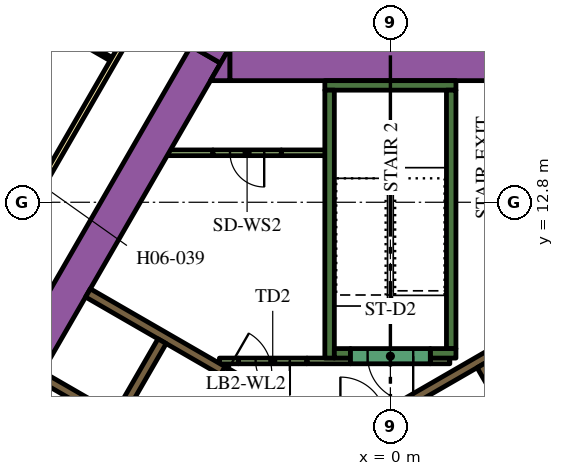
"""IFC4 building model, lengths in metres.
Left out: names, types, materials, properties, quantities, classifications, styles, units other than length and angle.
Written with IfcOpenShell. Run it as: python <this file> out.ifc"""

import sys

from ifc_helpers import new_model, si_unit, direction, frame, frame_2d, origin, place, context, subcontext, project, spatial, polyline, rectangle, outline, extrude, element, fill, save


model = new_model("IFC4")
c1 = context("Model", 3, precision=1e-05, world=origin(), true_north=direction((0.0, 1.0)))
c2 = subcontext(c1, "Body", "Model", "MODEL_VIEW")
j1 = project(units=[si_unit("LENGTHUNIT", "METRE"), si_unit("PLANEANGLEUNIT", "RADIAN")], contexts=[c1])
p1 = place(None, origin())
s1 = spatial("IfcSite", under=j1, at=p1, CompositionType="ELEMENT")
p2 = place(p1, origin())
s2 = spatial("IfcBuilding", under=s1, at=p2, CompositionType="ELEMENT")
p3 = place(p2, frame((0.0, 0.0, 83.7)))
s3 = spatial("IfcBuildingStorey", under=s2, at=p3, CompositionType="ELEMENT", Elevation=83.7)
p4 = place(p3, frame((-15.36, -1.503, 0.0), z_axis=(0.0, 0.0, 1.0), x_axis=(0.50000389221, 0.866023156604, 0.0)))
e1 = element("IfcWall", 1, at=p4, inside=s3, PredefinedType="SOLIDWALL", context=c2, shape_type="SweptSolid", body=[
    extrude(rectangle(XDim=21.0, YDim=0.9, at=frame_2d((10.5, 0.0))), origin(), (0.0, 0.0, 1.0), 3.9),
])
p5 = place(p3, origin())
e2 = element("IfcWall", 2, at=p5, inside=s3, PredefinedType="SOLIDWALL", context=c2, shape_type="SweptSolid", body=[
    extrude(outline(polyline([(-4.215, 16.9), (-4.469, 16.46), (-5.231, 16.9), (-4.215, 16.9)])), origin(), (0.0, 0.0, 1.0), 3.9),
])
p6 = place(p3, frame((-4.224, 16.45, 0.0), z_axis=(0.0, 0.0, 1.0), x_axis=(1.0, 0.0, 0.0)))
e3 = element("IfcWall", 3, at=p6, inside=s3, PredefinedType="SOLIDWALL", context=c2, shape_type="SweptSolid", body=[
    extrude(rectangle(XDim=9.488, YDim=0.9, at=frame_2d((4.744, 0.0))), origin(), (0.0, 0.0, 1.0), 3.9),
])
e4 = element("IfcWall", 4, at=p5, inside=s3, PredefinedType="SOLIDWALL", context=c2, shape_type="SweptSolid", body=[
    extrude(outline(polyline([(-4.734, 16.0), (-4.226, 16.88), (-4.226, 16.0), (-4.734, 16.0)])), origin(), (0.0, 0.0, 1.0), 3.9),
])
p7 = place(p3, frame((-1.725, 15.875, 0.0), z_axis=(0.0, 0.0, 1.0), x_axis=(1.0, 0.0, 0.0)))
e5 = element("IfcWall", 5, at=p7, inside=s3, PredefinedType="SOLIDWALL", context=c2, shape_type="SweptSolid", body=[
    extrude(rectangle(XDim=3.45, YDim=0.25, at=frame_2d((1.725, 0.0))), origin(), (0.0, 0.0, 1.0), 3.9),
])
p8 = place(p3, frame((1.6, 8.95, 0.0), z_axis=(0.0, 0.0, 1.0), x_axis=(0.0, 1.0, 0.0)))
e6 = element("IfcWall", 6, at=p8, inside=s3, PredefinedType="SOLIDWALL", context=c2, shape_type="SweptSolid", body=[
    extrude(rectangle(XDim=6.8, YDim=0.25, at=frame_2d((3.4, 0.0))), origin(), (0.0, 0.0, 1.0), 3.9),
])
p9 = place(p3, frame((1.05, 8.825, 0.0), z_axis=(0.0, 0.0, 1.0), x_axis=(1.0, 0.0, 0.0)))
e7 = element("IfcWall", 7, at=p9, inside=s3, PredefinedType="SOLIDWALL", context=c2, shape_type="SweptSolid", body=[
    extrude(rectangle(XDim=0.675, YDim=0.25, at=frame_2d((0.337, 0.0))), origin(), (0.0, 0.0, 1.0), 3.9),
])
p10 = place(p3, frame((-1.6, 8.7, 0.0), z_axis=(0.0, 0.0, 1.0), x_axis=(0.0, 1.0, 0.0)))
e8 = element("IfcWall", 8, at=p10, inside=s3, PredefinedType="SOLIDWALL", context=c2, shape_type="SweptSolid", body=[
    extrude(rectangle(XDim=7.05, YDim=0.25, at=frame_2d((3.525, 0.0))), origin(), (0.0, 0.0, 1.0), 3.9),
])
p11 = place(p3, frame((-1.475, 8.825, 0.0), z_axis=(0.0, 0.0, 1.0), x_axis=(1.0, 0.0, 0.0)))
e9 = element("IfcWall", 9, at=p11, inside=s3, PredefinedType="SOLIDWALL", context=c2, shape_type="SweptSolid", body=[
    extrude(rectangle(XDim=0.425, YDim=0.25, at=frame_2d((0.212, 0.0))), origin(), (0.0, 0.0, 1.0), 3.9),
])
p12 = place(p3, frame((0.314, 7.456, 0.0), z_axis=(0.0, 0.0, 1.0), x_axis=(0.866013897511, 0.50001992892, 0.0)))
e10 = element("IfcWall", 10, at=p12, inside=s3, PredefinedType="SOLIDWALL", context=c2, shape_type="SweptSolid", body=[
    extrude(rectangle(XDim=3.268, YDim=0.25, at=frame_2d((1.634, 0.0))), origin(), (0.0, 0.0, 1.0), 3.9),
])
e11 = element("IfcWall", 11, at=p5, inside=s3, PredefinedType="SOLIDWALL", context=c2, shape_type="SweptSolid", body=[
    extrude(outline(polyline([(-3.128, 7.481), (-3.259, 7.557), (-3.134, 7.773), (-3.003, 7.698), (-3.128, 7.481)])), origin(), (0.0, 0.0, 1.0), 3.9),
])
p13 = place(p3, frame((-7.314, 7.132, 0.0), z_axis=(0.0, 0.0, 1.0), x_axis=(-0.866008176907, 0.50002983664, 0.0)))
e12 = element("IfcWall", 12, at=p13, inside=s3, PredefinedType="SOLIDWALL", context=c2, shape_type="SweptSolid", body=[
    extrude(rectangle(XDim=2.2, YDim=0.25, at=frame_2d((1.1, 0.0))), origin(), (0.0, 0.0, 1.0), 3.9),
])
p14 = place(p3, frame((-7.959, 10.415, 0.0), z_axis=(0.0, 0.0, 1.0), x_axis=(0.866020958405, -0.500007699544, 0.0)))
e13 = element("IfcWall", 13, at=p14, inside=s3, PredefinedType="SOLIDWALL", context=c2, shape_type="SweptSolid", body=[
    extrude(rectangle(XDim=4.1, YDim=0.25, at=frame_2d((2.05, 0.0))), origin(), (0.0, 0.0, 1.0), 3.9),
])
p15 = place(p3, frame((-3.997, 8.625, 0.0), z_axis=(0.0, 0.0, 1.0), x_axis=(-1.0, 0.0, 0.0)))
e14 = element("IfcWall", 14, at=p15, inside=s3, PredefinedType="PARTITIONING", context=c2, shape_type="SweptSolid", body=[
    extrude(rectangle(XDim=0.502, YDim=0.15, at=frame_2d((0.251, 0.0))), origin(), (0.0, 0.0, 1.0), 2.75),
])
p16 = place(p3, frame((-5.851, 14.102, 0.0), z_axis=(0.0, 0.0, 1.0), x_axis=(1.0, 0.0, 0.0)))
e15 = element("IfcWall", 15, at=p16, inside=s3, PredefinedType="PARTITIONING", context=c2, shape_type="SweptSolid", body=[
    extrude(rectangle(XDim=1.18, YDim=0.15, at=frame_2d((0.59, 0.0))), origin(), (0.0, 0.0, 1.0), 2.75),
])
p17 = place(p3, frame((-2.871, 14.102, 0.0), z_axis=(0.0, 0.0, 1.0), x_axis=(1.0, 0.0, 0.0)))
e16 = element("IfcWall", 16, at=p17, inside=s3, PredefinedType="PARTITIONING", context=c2, shape_type="SweptSolid", body=[
    extrude(rectangle(XDim=1.196, YDim=0.15, at=frame_2d((0.598, 0.0))), origin(), (0.0, 0.0, 1.0), 2.75),
])
p18 = place(p3, frame((-2.196, 8.625, 0.0), z_axis=(0.0, 0.0, 1.0), x_axis=(1.0, 0.0, 0.0)))
e17 = element("IfcWall", 17, at=p18, inside=s3, PredefinedType="PARTITIONING", context=c2, shape_type="SweptSolid", body=[
    extrude(rectangle(XDim=1.146, YDim=0.15, at=frame_2d((0.573, 0.0))), origin(), (0.0, 0.0, 1.0), 2.75),
])
p19 = place(p3, frame((1.05, 8.625, 0.0), z_axis=(0.0, 0.0, 1.0), x_axis=(1.0, 0.0, 0.0)))
e18 = element("IfcWall", 18, at=p19, inside=s3, PredefinedType="PARTITIONING", context=c2, shape_type="SweptSolid", body=[
    extrude(rectangle(XDim=0.514, YDim=0.15, at=frame_2d((0.257, 0.0))), origin(), (0.0, 0.0, 1.0), 2.75),
])
p20 = place(p3, frame((8.565, -2.185, 0.0), z_axis=(0.0, 0.0, 1.0), x_axis=(-0.499997954832, 0.866026584559, 0.0)))
e19 = element("IfcWall", 19, at=p20, inside=s3, PredefinedType="SOLIDWALL", context=c2, shape_type="SweptSolid", body=[
    extrude(rectangle(XDim=12.35, YDim=0.25, at=frame_2d((6.175, 0.0))), origin(), (0.0, 0.0, 1.0), 3.9),
])
p21 = place(p20, frame((5.725, 0.0, 0.0)))
e20 = element("IfcOpeningElement", 20, at=p21, cuts=e19, PredefinedType="OPENING", context=c2, shape_type="SweptSolid", body=[
    extrude(rectangle(XDim=0.9, YDim=2.1, at=frame_2d((0.45, 1.05))), frame((0.0, 0.135, 0.0), z_axis=(0.0, -1.0, 0.0), x_axis=(1.0, 0.0, 0.0)), (0.0, 0.0, 1.0), 0.27),
])
p22 = place(p3, frame((-6.008, 9.144, 0.0), z_axis=(0.0, 0.0, 1.0), x_axis=(-0.500006956611, -0.866021387346, 0.0)))
e21 = element("IfcWall", 21, at=p22, inside=s3, PredefinedType="SOLIDWALL", context=c2, shape_type="SweptSolid", body=[
    extrude(rectangle(XDim=9.83, YDim=0.25, at=frame_2d((4.915, 0.0))), origin(), (0.0, 0.0, 1.0), 3.9),
])
p23 = place(p22, frame((6.985, 0.0, 0.0)))
e22 = element("IfcOpeningElement", 22, at=p23, cuts=e21, PredefinedType="OPENING", context=c2, shape_type="SweptSolid", body=[
    extrude(rectangle(XDim=0.9, YDim=2.1, at=frame_2d((0.45, 1.05))), frame((0.0, 0.135, 0.0), z_axis=(0.0, -1.0, 0.0), x_axis=(1.0, 0.0, 0.0)), (0.0, 0.0, 1.0), 0.27),
])
p24 = place(p3, frame((1.05, 8.75, 0.0), z_axis=(0.0, 0.0, 1.0), x_axis=(-1.0, 0.0, 0.0)))
e23 = element("IfcWall", 23, at=p24, inside=s3, PredefinedType="SOLIDWALL", context=c2, shape_type="SweptSolid", body=[
    extrude(rectangle(XDim=2.1, YDim=0.4, at=frame_2d((1.05, 0.0))), origin(), (0.0, 0.0, 1.0), 3.9),
])
p25 = place(p24, frame((0.45, 0.0, 0.0)))
e24 = element("IfcOpeningElement", 24, at=p25, cuts=e23, PredefinedType="OPENING", context=c2, shape_type="SweptSolid", body=[
    extrude(rectangle(XDim=1.2, YDim=2.1, at=frame_2d((0.6, 1.05))), frame((0.0, 0.21, 0.0), z_axis=(0.0, -1.0, 0.0), x_axis=(1.0, 0.0, 0.0)), (0.0, 0.0, 1.0), 0.42),
])
p26 = place(p3, frame((-2.196, 8.625, 0.0), z_axis=(0.0, 0.0, 1.0), x_axis=(-1.0, 0.0, 0.0)))
e25 = element("IfcWall", 25, at=p26, inside=s3, PredefinedType="PARTITIONING", context=c2, shape_type="SweptSolid", body=[
    extrude(rectangle(XDim=1.8, YDim=0.15, at=frame_2d((0.9, 0.0))), origin(), (0.0, 0.0, 1.0), 2.75),
])
p27 = place(p26, frame((0.45, 0.0, 0.0)))
e26 = element("IfcOpeningElement", 26, at=p27, cuts=e25, PredefinedType="OPENING", context=c2, shape_type="SweptSolid", body=[
    extrude(rectangle(XDim=0.9, YDim=2.1, at=frame_2d((0.45, 1.05))), frame((0.0, 0.085, 0.0), z_axis=(0.0, -1.0, 0.0), x_axis=(1.0, 0.0, 0.0)), (0.0, 0.0, 1.0), 0.17),
])
p28 = place(p3, frame((-4.409, 8.365, 0.0), z_axis=(0.0, 0.0, 1.0), x_axis=(0.866034573852, -0.49998411664, 0.0)))
e27 = element("IfcWall", 27, at=p28, inside=s3, PredefinedType="SOLIDWALL", context=c2, shape_type="SweptSolid", body=[
    extrude(rectangle(XDim=1.4, YDim=0.25, at=frame_2d((0.7, 0.0))), origin(), (0.0, 0.0, 1.0), 3.9),
])
p29 = place(p28, frame((0.1, 0.0, 0.0)))
e28 = element("IfcOpeningElement", 28, at=p29, cuts=e27, PredefinedType="OPENING", context=c2, shape_type="SweptSolid", body=[
    extrude(rectangle(XDim=1.2, YDim=2.1, at=frame_2d((0.6, 1.05))), frame((0.0, 0.135, 0.0), z_axis=(0.0, -1.0, 0.0), x_axis=(1.0, 0.0, 0.0)), (0.0, 0.0, 1.0), 0.27),
])
p30 = place(p3, frame((-2.871, 14.102, 0.0), z_axis=(0.0, 0.0, 1.0), x_axis=(-1.0, 0.0, 0.0)))
e29 = element("IfcWall", 29, at=p30, inside=s3, PredefinedType="PARTITIONING", context=c2, shape_type="SweptSolid", body=[
    extrude(rectangle(XDim=1.8, YDim=0.15, at=frame_2d((0.9, 0.0))), origin(), (0.0, 0.0, 1.0), 2.75),
])
p31 = place(p30, frame((0.45, 0.0, 0.0)))
e30 = element("IfcOpeningElement", 30, at=p31, cuts=e29, PredefinedType="OPENING", context=c2, shape_type="SweptSolid", body=[
    extrude(rectangle(XDim=0.9, YDim=2.1, at=frame_2d((0.45, 1.05))), frame((0.0, 0.085, 0.0), z_axis=(0.0, -1.0, 0.0), x_axis=(1.0, 0.0, 0.0)), (0.0, 0.0, 1.0), 0.17),
])
p32 = place(p3, frame((-19.081, -3.9, 0.0), z_axis=(0.0, 0.0, 1.0), x_axis=(0.499998313975, 0.866026377209, 0.0)))
e31 = element("IfcWall", 31, at=p32, inside=s3, PredefinedType="PARTITIONING", context=c2, shape_type="SweptSolid", body=[
    extrude(rectangle(XDim=25.766, YDim=0.15, at=frame_2d((12.883, 0.0))), origin(), (0.0, 0.0, 1.0), 2.75),
])
p33 = place(p32, frame((19.306, 0.0, 0.0)))
e32 = element("IfcOpeningElement", 32, at=p33, cuts=e31, PredefinedType="OPENING", context=c2, shape_type="SweptSolid", body=[
    extrude(rectangle(XDim=1.0, YDim=2.1, at=frame_2d((0.5, 1.05))), frame((0.0, 0.085, 0.0), z_axis=(0.0, -1.0, 0.0), x_axis=(1.0, 0.0, 0.0)), (0.0, 0.0, 1.0), 0.17),
])
p34 = place(p32, frame((18.0, 0.0, 0.0)))
e33 = element("IfcOpeningElement", 33, at=p34, cuts=e31, PredefinedType="OPENING", context=c2, shape_type="SweptSolid", body=[
    extrude(rectangle(XDim=1.0, YDim=2.1, at=frame_2d((0.5, 1.05))), frame((0.0, 0.085, 0.0), z_axis=(0.0, -1.0, 0.0), x_axis=(1.0, 0.0, 0.0)), (0.0, 0.0, 1.0), 0.17),
])
p35 = place(p32, frame((10.874, 0.0, 0.0)))
e34 = element("IfcOpeningElement", 34, at=p35, cuts=e31, PredefinedType="OPENING", context=c2, shape_type="SweptSolid", body=[
    extrude(rectangle(XDim=0.9, YDim=2.1, at=frame_2d((0.45, 1.05))), frame((0.0, 0.085, 0.0), z_axis=(0.0, -1.0, 0.0), x_axis=(1.0, 0.0, 0.0)), (0.0, 0.0, 1.0), 0.17),
])
p36 = place(p32, frame((8.548, 0.0, 0.0)))
e35 = element("IfcOpeningElement", 35, at=p36, cuts=e31, PredefinedType="OPENING", context=c2, shape_type="SweptSolid", body=[
    extrude(rectangle(XDim=1.1, YDim=2.1, at=frame_2d((0.55, 1.05))), frame((0.0, 0.085, 0.0), z_axis=(0.0, -1.0, 0.0), x_axis=(1.0, 0.0, 0.0)), (0.0, 0.0, 1.0), 0.17),
])
p37 = place(p32, frame((0.18, 0.0, 0.0)))
e36 = element("IfcOpeningElement", 36, at=p37, cuts=e31, PredefinedType="OPENING", context=c2, shape_type="SweptSolid", body=[
    extrude(rectangle(XDim=1.0, YDim=2.1, at=frame_2d((0.5, 1.05))), frame((0.0, 0.085, 0.0), z_axis=(0.0, -1.0, 0.0), x_axis=(1.0, 0.0, 0.0)), (0.0, 0.0, 1.0), 0.17),
])
p38 = place(p3, frame((-9.603, 17.868, 0.0), z_axis=(0.0, 0.0, 1.0), x_axis=(0.866021400173, -0.500006934395, 0.0)))
e37 = element("IfcWall", 37, at=p38, inside=s3, PredefinedType="PARTITIONING", context=c2, shape_type="SweptSolid", body=[
    extrude(rectangle(XDim=2.6, YDim=0.1, at=frame_2d((1.3, 0.0))), origin(), (0.0, 0.0, 1.0), 2.75),
])
p39 = place(p38, frame((1.1, 0.0, 0.0)))
e38 = element("IfcOpeningElement", 38, at=p39, cuts=e37, PredefinedType="OPENING", context=c2, shape_type="SweptSolid", body=[
    extrude(rectangle(XDim=0.9, YDim=2.1, at=frame_2d((0.45, 1.05))), frame((0.0, 0.06, 0.0), z_axis=(0.0, -1.0, 0.0), x_axis=(1.0, 0.0, 0.0)), (0.0, 0.0, 1.0), 0.12),
])
p40 = place(p25, origin())
e39 = element("IfcDoor", 39, at=p40, inside=s3, OperationType="SINGLE_SWING_LEFT", PredefinedType="DOOR", context=c2, shape_type="SweptSolid", body=[
    extrude(rectangle(XDim=1.2, YDim=2.1, at=frame_2d((0.6, 1.05))), frame((0.0, 0.025, 0.0), z_axis=(0.0, -1.0, 0.0), x_axis=(1.0, 0.0, 0.0)), (0.0, 0.0, 1.0), 0.05),
])
fill(e24, e39)
p41 = place(p27, origin())
e40 = element("IfcDoor", 40, at=p41, inside=s3, OperationType="SINGLE_SWING_LEFT", PredefinedType="DOOR", context=c2, shape_type="SweptSolid", body=[
    extrude(rectangle(XDim=0.9, YDim=2.1, at=frame_2d((0.45, 1.05))), frame((0.0, 0.025, 0.0), z_axis=(0.0, -1.0, 0.0), x_axis=(1.0, 0.0, 0.0)), (0.0, 0.0, 1.0), 0.05),
])
fill(e26, e40)
p42 = place(p29, origin())
e41 = element("IfcDoor", 41, at=p42, inside=s3, OperationType="SINGLE_SWING_LEFT", PredefinedType="DOOR", context=c2, shape_type="SweptSolid", body=[
    extrude(rectangle(XDim=1.2, YDim=2.1, at=frame_2d((0.6, 1.05))), frame((0.0, 0.025, 0.0), z_axis=(0.0, -1.0, 0.0), x_axis=(1.0, 0.0, 0.0)), (0.0, 0.0, 1.0), 0.05),
])
fill(e28, e41)
p43 = place(p31, origin())
e42 = element("IfcDoor", 42, at=p43, inside=s3, OperationType="SINGLE_SWING_LEFT", PredefinedType="DOOR", context=c2, shape_type="SweptSolid", body=[
    extrude(rectangle(XDim=0.9, YDim=2.1, at=frame_2d((0.45, 1.05))), frame((0.0, 0.025, 0.0), z_axis=(0.0, -1.0, 0.0), x_axis=(1.0, 0.0, 0.0)), (0.0, 0.0, 1.0), 0.05),
])
fill(e30, e42)
save(model, sys.argv[1])
